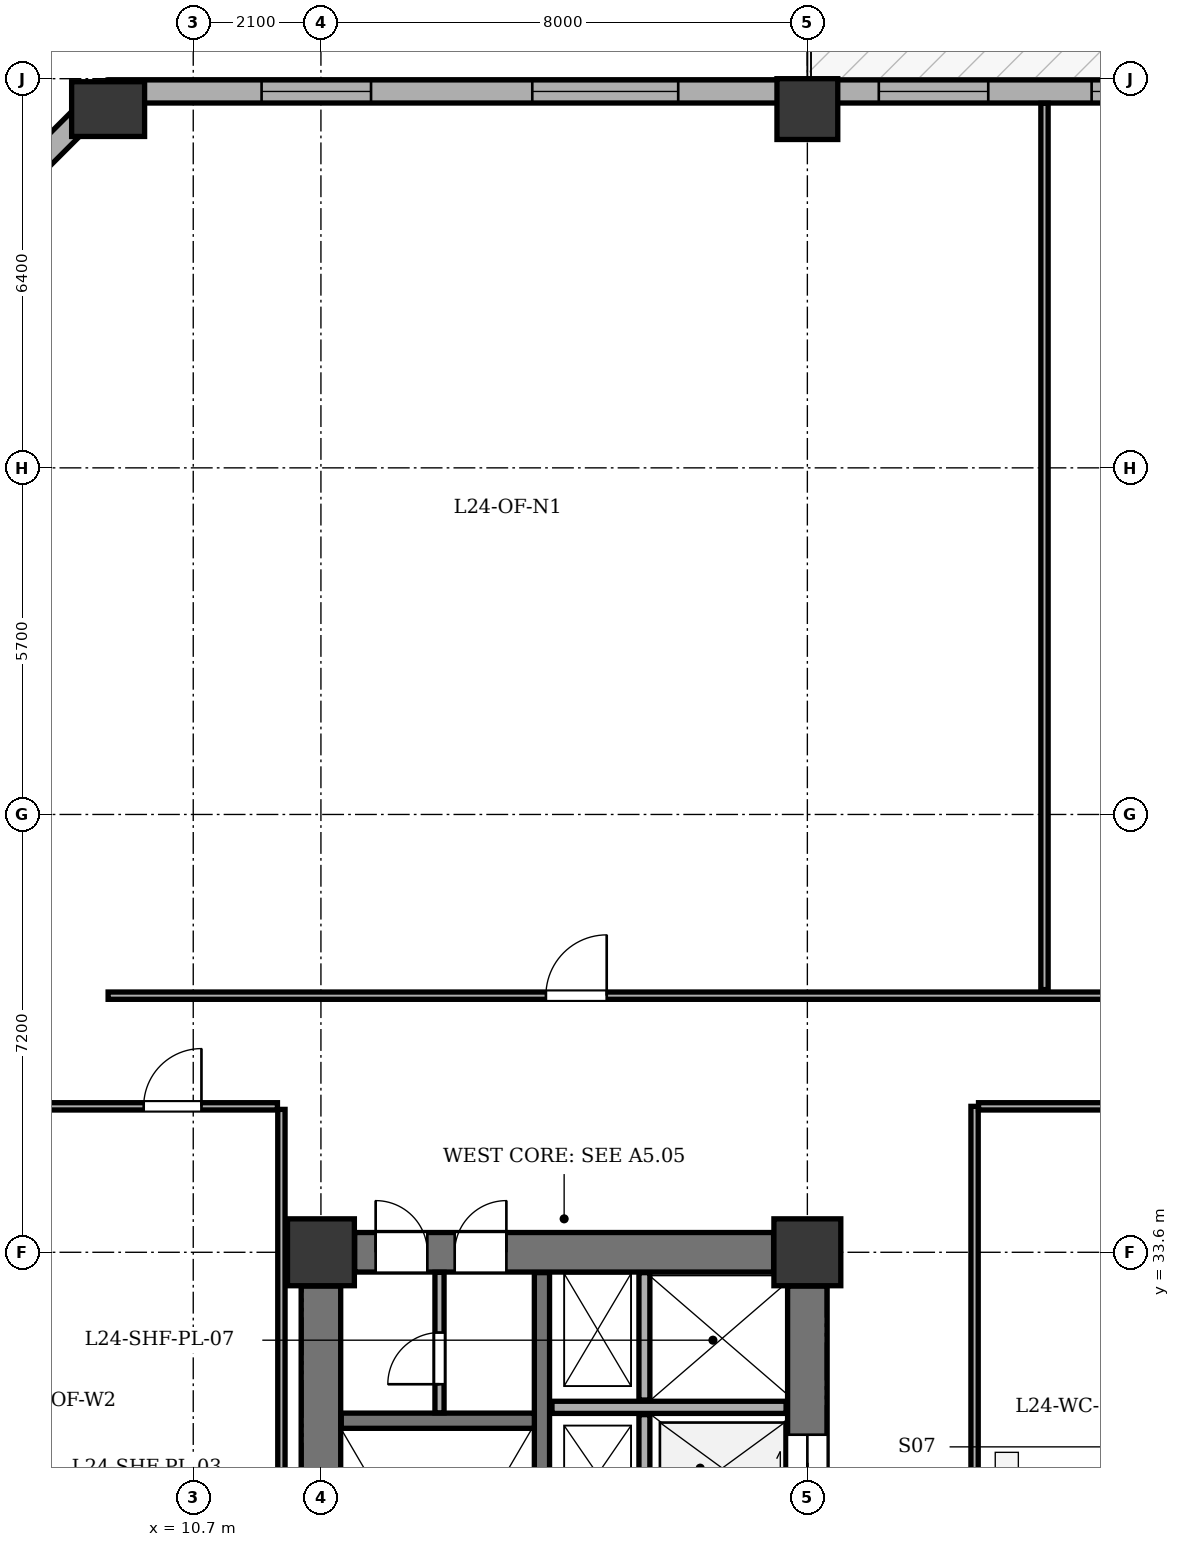
"""IFC4 building model, lengths in metres.
Left out: names, types, materials, properties, quantities, classifications, styles, units other than length and angle.
Written with IfcOpenShell. Run it as: python <this file> out.ifc"""

import sys

from ifc_helpers import new_model, si_unit, direction, frame, frame_2d, origin, origin_2d, place, context, subcontext, project, spatial, rectangle, extrude, element, fill, save


model = new_model("IFC4")
c1 = context("Model", 3, precision=1e-05, world=origin(), true_north=direction((0.0, 1.0)))
c2 = subcontext(c1, "Body", "Model", "MODEL_VIEW")
j1 = project(units=[si_unit("LENGTHUNIT", "METRE"), si_unit("PLANEANGLEUNIT", "RADIAN")], contexts=[c1])
p1 = place(None, origin())
s1 = spatial("IfcSite", under=j1, at=p1, CompositionType="ELEMENT")
p2 = place(p1, origin())
s2 = spatial("IfcBuilding", under=s1, at=p2, CompositionType="ELEMENT")
p3 = place(p2, frame((0.0, 0.0, 98.4)))
s3 = spatial("IfcBuildingStorey", under=s2, at=p3, CompositionType="ELEMENT", Elevation=98.4)
for number, where, z_axis, x_axis in (
    (1, (12.8, 33.6, 0.0), (0.0, 0.0, 1.0), (1.0, 0.0, 0.0)),
    (2, (20.8, 33.6, 0.0), (0.0, 0.0, 1.0), (1.0, 0.0, 0.0)),
):
    element("IfcColumn", number, at=place(p3, frame(where, z_axis=z_axis, x_axis=x_axis)), inside=s3, PredefinedType="COLUMN", context=c2, shape_type="SweptSolid", body=[
        extrude(rectangle(XDim=1.1, YDim=1.1, at=origin_2d()), origin(), (0.0, 0.0, 1.0), 3.9),
    ])
p4 = place(p3, frame((9.3, 52.4, 0.0), z_axis=(0.0, 0.0, 1.0), x_axis=(1.0, 0.0, 0.0)))
e3 = element("IfcColumn", 3, at=p4, inside=s3, PredefinedType="COLUMN", context=c2, shape_type="SweptSolid", body=[
    extrude(rectangle(XDim=0.9, YDim=1.2, at=origin_2d()), origin(), (0.0, 0.0, 1.0), 3.9),
])
p5 = place(p3, frame((20.8, 52.4, 0.0), z_axis=(0.0, 0.0, 1.0), x_axis=(1.0, 0.0, 0.0)))
e4 = element("IfcColumn", 4, at=p5, inside=s3, PredefinedType="COLUMN", context=c2, shape_type="SweptSolid", body=[
    extrude(rectangle(XDim=1.0, YDim=1.0, at=origin_2d()), origin(), (0.0, 0.0, 1.0), 3.9),
])
p6 = place(p3, frame((4.51, 47.9, 0.0), z_axis=(0.0, 0.0, 1.0), x_axis=(0.707106781187, 0.707106781187, 0.0)))
e5 = element("IfcWall", 5, at=p6, inside=s3, PredefinedType="STANDARD", context=c2, shape_type="SweptSolid", body=[
    extrude(rectangle(XDim=6.774, YDim=0.38, at=frame_2d((3.387, 0.0))), origin(), (0.0, 0.0, 1.0), 3.135),
])
p7 = place(p6, frame((2.687, 0.0, 0.8)))
e6 = element("IfcOpeningElement", 6, at=p7, cuts=e5, PredefinedType="OPENING", context=c2, shape_type="SweptSolid", body=[
    extrude(rectangle(XDim=1.4, YDim=1.65, at=frame_2d((0.7, 0.825))), frame((0.0, 0.2, 0.0), z_axis=(0.0, -1.0, 0.0), x_axis=(1.0, 0.0, 0.0)), (0.0, 0.0, 1.0), 0.4),
])
p8 = place(p3, frame((9.3, 52.69, 0.0), z_axis=(0.0, 0.0, 1.0), x_axis=(1.0, 0.0, 0.0)))
e7 = element("IfcWall", 7, at=p8, inside=s3, PredefinedType="STANDARD", context=c2, shape_type="SweptSolid", body=[
    extrude(rectangle(XDim=35.0, YDim=0.38, at=frame_2d((17.5, 0.0))), origin(), (0.0, 0.0, 1.0), 3.135),
])
p9 = place(p8, frame((22.0, 0.0, 0.0)))
e8 = element("IfcOpeningElement", 8, at=p9, cuts=e7, PredefinedType="OPENING", context=c2, shape_type="SweptSolid", body=[
    extrude(rectangle(XDim=1.0, YDim=2.02, at=frame_2d((0.5, 1.01))), frame((0.0, 0.2, 0.0), z_axis=(0.0, -1.0, 0.0), x_axis=(1.0, 0.0, 0.0)), (0.0, 0.0, 1.0), 0.4),
])
p10 = place(p8, frame((2.524, 0.0, 0.8)))
e9 = element("IfcOpeningElement", 9, at=p10, cuts=e7, PredefinedType="OPENING", context=c2, shape_type="SweptSolid", body=[
    extrude(rectangle(XDim=1.8, YDim=1.9, at=frame_2d((0.9, 0.95))), frame((0.0, 0.2, 0.0), z_axis=(0.0, -1.0, 0.0), x_axis=(1.0, 0.0, 0.0)), (0.0, 0.0, 1.0), 0.4),
])
p11 = place(p8, frame((6.976, 0.0, 0.8)))
e10 = element("IfcOpeningElement", 10, at=p11, cuts=e7, PredefinedType="OPENING", context=c2, shape_type="SweptSolid", body=[
    extrude(rectangle(XDim=2.4, YDim=1.9, at=frame_2d((1.2, 0.95))), frame((0.0, 0.2, 0.0), z_axis=(0.0, -1.0, 0.0), x_axis=(1.0, 0.0, 0.0)), (0.0, 0.0, 1.0), 0.4),
])
p12 = place(p8, frame((12.675, 0.0, 0.8)))
e11 = element("IfcOpeningElement", 11, at=p12, cuts=e7, PredefinedType="OPENING", context=c2, shape_type="SweptSolid", body=[
    extrude(rectangle(XDim=1.8, YDim=1.9, at=frame_2d((0.9, 0.95))), frame((0.0, 0.2, 0.0), z_axis=(0.0, -1.0, 0.0), x_axis=(1.0, 0.0, 0.0)), (0.0, 0.0, 1.0), 0.4),
])
p13 = place(p8, frame((16.175, 0.0, 0.8)))
e12 = element("IfcOpeningElement", 12, at=p13, cuts=e7, PredefinedType="OPENING", context=c2, shape_type="SweptSolid", body=[
    extrude(rectangle(XDim=1.5, YDim=1.9, at=frame_2d((0.75, 0.95))), frame((0.0, 0.2, 0.0), z_axis=(0.0, -1.0, 0.0), x_axis=(1.0, 0.0, 0.0)), (0.0, 0.0, 1.0), 0.4),
])
p14 = place(p8, frame((27.7, 0.0, 0.8)))
e13 = element("IfcOpeningElement", 13, at=p14, cuts=e7, PredefinedType="OPENING", context=c2, shape_type="SweptSolid", body=[
    extrude(rectangle(XDim=1.8, YDim=1.9, at=frame_2d((0.9, 0.95))), frame((0.0, 0.2, 0.0), z_axis=(0.0, -1.0, 0.0), x_axis=(1.0, 0.0, 0.0)), (0.0, 0.0, 1.0), 0.4),
])
p15 = place(p8, frame((31.0, 0.0, 0.8)))
e14 = element("IfcOpeningElement", 14, at=p15, cuts=e7, PredefinedType="OPENING", context=c2, shape_type="SweptSolid", body=[
    extrude(rectangle(XDim=2.4, YDim=1.9, at=frame_2d((1.2, 0.95))), frame((0.0, 0.2, 0.0), z_axis=(0.0, -1.0, 0.0), x_axis=(1.0, 0.0, 0.0)), (0.0, 0.0, 1.0), 0.4),
])
p16 = place(p3, frame((12.8, 21.355, 0.0), z_axis=(0.0, 0.0, 1.0), x_axis=(0.0, 1.0, 0.0)))
e15 = element("IfcWall", 15, at=p16, inside=s3, PredefinedType="SHEAR", context=c2, shape_type="SweptSolid", body=[
    extrude(rectangle(XDim=11.69, YDim=0.65, at=frame_2d((5.845, 0.0))), origin(), (0.0, 0.0, 1.0), 3.6),
])
p17 = place(p3, frame((13.355, 33.6, 0.0), z_axis=(0.0, 0.0, 1.0), x_axis=(1.0, 0.0, 0.0)))
e16 = element("IfcWall", 16, at=p17, inside=s3, PredefinedType="SHEAR", context=c2, shape_type="SweptSolid", body=[
    extrude(rectangle(XDim=6.89, YDim=0.65, at=frame_2d((3.445, 0.0))), origin(), (0.0, 0.0, 1.0), 3.6),
])
p18 = place(p17, frame((0.345, 0.0, 0.0)))
e17 = element("IfcOpeningElement", 17, at=p18, cuts=e16, PredefinedType="OPENING", context=c2, shape_type="SweptSolid", body=[
    extrude(rectangle(XDim=0.85, YDim=2.02, at=frame_2d((0.425, 1.01))), frame((0.0, 0.335, 0.0), z_axis=(0.0, -1.0, 0.0), x_axis=(1.0, 0.0, 0.0)), (0.0, 0.0, 1.0), 0.67),
])
p19 = place(p17, frame((1.645, 0.0, 0.0)))
e18 = element("IfcOpeningElement", 18, at=p19, cuts=e16, PredefinedType="OPENING", context=c2, shape_type="SweptSolid", body=[
    extrude(rectangle(XDim=0.85, YDim=2.02, at=frame_2d((0.425, 1.01))), frame((0.0, 0.335, 0.0), z_axis=(0.0, -1.0, 0.0), x_axis=(1.0, 0.0, 0.0)), (0.0, 0.0, 1.0), 0.67),
])
p20 = place(p3, frame((20.8, 21.355, 0.0), z_axis=(0.0, 0.0, 1.0), x_axis=(0.0, 1.0, 0.0)))
e19 = element("IfcWall", 19, at=p20, inside=s3, PredefinedType="SHEAR", context=c2, shape_type="SweptSolid", body=[
    extrude(rectangle(XDim=11.69, YDim=0.65, at=frame_2d((5.845, 0.0))), origin(), (0.0, 0.0, 1.0), 3.6),
])
p21 = place(p20, frame((1.245, 0.0, 0.0)))
e20 = element("IfcOpeningElement", 20, at=p21, cuts=e19, PredefinedType="OPENING", context=c2, shape_type="SweptSolid", body=[
    extrude(rectangle(XDim=1.2, YDim=2.15, at=frame_2d((0.6, 1.075))), frame((0.0, 0.335, 0.0), z_axis=(0.0, -1.0, 0.0), x_axis=(1.0, 0.0, 0.0)), (0.0, 0.0, 1.0), 0.67),
])
p22 = place(p20, frame((4.245, 0.0, 0.0)))
e21 = element("IfcOpeningElement", 21, at=p22, cuts=e19, PredefinedType="OPENING", context=c2, shape_type="SweptSolid", body=[
    extrude(rectangle(XDim=1.1, YDim=2.1, at=frame_2d((0.55, 1.05))), frame((0.0, 0.335, 0.0), z_axis=(0.0, -1.0, 0.0), x_axis=(1.0, 0.0, 0.0)), (0.0, 0.0, 1.0), 0.67),
])
p23 = place(p20, frame((6.195, 0.0, 0.0)))
e22 = element("IfcOpeningElement", 22, at=p23, cuts=e19, PredefinedType="OPENING", context=c2, shape_type="SweptSolid", body=[
    extrude(rectangle(XDim=1.1, YDim=2.1, at=frame_2d((0.55, 1.05))), frame((0.0, 0.335, 0.0), z_axis=(0.0, -1.0, 0.0), x_axis=(1.0, 0.0, 0.0)), (0.0, 0.0, 1.0), 0.67),
])
p24 = place(p20, frame((8.145, 0.0, 0.0)))
e23 = element("IfcOpeningElement", 23, at=p24, cuts=e19, PredefinedType="OPENING", context=c2, shape_type="SweptSolid", body=[
    extrude(rectangle(XDim=1.1, YDim=2.1, at=frame_2d((0.55, 1.05))), frame((0.0, 0.335, 0.0), z_axis=(0.0, -1.0, 0.0), x_axis=(1.0, 0.0, 0.0)), (0.0, 0.0, 1.0), 0.67),
])
p25 = place(p3, frame((16.435, 21.135, 0.0), z_axis=(0.0, 0.0, 1.0), x_axis=(0.0, 1.0, 0.0)))
e24 = element("IfcWall", 24, at=p25, inside=s3, PredefinedType="SHEAR", context=c2, shape_type="SweptSolid", body=[
    extrude(rectangle(XDim=12.13, YDim=0.25, at=frame_2d((6.065, 0.0))), origin(), (0.0, 0.0, 1.0), 3.6),
])
p26 = place(p25, frame((0.515, 0.0, 0.0)))
e25 = element("IfcOpeningElement", 25, at=p26, cuts=e24, PredefinedType="OPENING", context=c2, shape_type="SweptSolid", body=[
    extrude(rectangle(XDim=1.2, YDim=2.15, at=frame_2d((0.6, 1.075))), frame((0.0, 0.135, 0.0), z_axis=(0.0, -1.0, 0.0), x_axis=(1.0, 0.0, 0.0)), (0.0, 0.0, 1.0), 0.27),
])
p27 = place(p25, frame((2.665, 0.0, 0.0)))
e26 = element("IfcOpeningElement", 26, at=p27, cuts=e24, PredefinedType="OPENING", context=c2, shape_type="SweptSolid", body=[
    extrude(rectangle(XDim=1.15, YDim=2.15, at=frame_2d((0.575, 1.075))), frame((0.0, 0.135, 0.0), z_axis=(0.0, -1.0, 0.0), x_axis=(1.0, 0.0, 0.0)), (0.0, 0.0, 1.0), 0.27),
])
p28 = place(p3, frame((13.135, 30.83, 0.0), z_axis=(0.0, 0.0, 1.0), x_axis=(1.0, 0.0, 0.0)))
e27 = element("IfcWall", 27, at=p28, inside=s3, PredefinedType="SHEAR", context=c2, shape_type="SweptSolid", body=[
    extrude(rectangle(XDim=3.175, YDim=0.25, at=frame_2d((1.587, 0.0))), origin(), (0.0, 0.0, 1.0), 3.6),
])
p29 = place(p3, frame((16.6, 31.05, 0.0), z_axis=(0.0, 0.0, 1.0), x_axis=(1.0, 0.0, 0.0)))
e28 = element("IfcWall", 28, at=p29, inside=s3, PredefinedType="SOLIDWALL", context=c2, shape_type="SweptSolid", body=[
    extrude(rectangle(XDim=3.85, YDim=0.2, at=frame_2d((1.925, 0.0))), origin(), (0.0, 0.0, 1.0), 3.6),
])
p30 = place(p3, frame((18.12, 25.27, 0.0), z_axis=(0.0, 0.0, 1.0), x_axis=(0.0, 1.0, 0.0)))
e29 = element("IfcWall", 29, at=p30, inside=s3, PredefinedType="PARTITIONING", context=c2, shape_type="SweptSolid", body=[
    extrude(rectangle(XDim=5.66, YDim=0.18, at=frame_2d((2.83, 0.0))), origin(), (0.0, 0.0, 1.0), 3.6),
])
p31 = place(p3, frame((18.12, 31.17, 0.0), z_axis=(0.0, 0.0, 1.0), x_axis=(0.0, 1.0, 0.0)))
e30 = element("IfcWall", 30, at=p31, inside=s3, PredefinedType="PARTITIONING", context=c2, shape_type="SweptSolid", body=[
    extrude(rectangle(XDim=2.095, YDim=0.18, at=frame_2d((1.047, 0.0))), origin(), (0.0, 0.0, 1.0), 3.6),
])
p32 = place(p3, frame((14.75, 30.96, 0.0), z_axis=(0.0, 0.0, 1.0), x_axis=(0.0, 1.0, 0.0)))
e31 = element("IfcWall", 31, at=p32, inside=s3, PredefinedType="PARTITIONING", context=c2, shape_type="SweptSolid", body=[
    extrude(rectangle(XDim=2.31, YDim=0.15, at=frame_2d((1.155, 0.0))), origin(), (0.0, 0.0, 1.0), 3.6),
])
p33 = place(p32, frame((0.47, 0.0, 0.0)))
e32 = element("IfcOpeningElement", 32, at=p33, cuts=e31, PredefinedType="OPENING", context=c2, shape_type="SweptSolid", body=[
    extrude(rectangle(XDim=0.85, YDim=2.02, at=frame_2d((0.425, 1.01))), frame((0.0, 0.085, 0.0), z_axis=(0.0, -1.0, 0.0), x_axis=(1.0, 0.0, 0.0)), (0.0, 0.0, 1.0), 0.17),
])
p34 = place(p3, frame((23.55, 24.715, 0.0), z_axis=(0.0, 0.0, 1.0), x_axis=(0.0, 1.0, 0.0)))
e33 = element("IfcWall", 33, at=p34, inside=s3, PredefinedType="PARTITIONING", context=c2, shape_type="SweptSolid", body=[
    extrude(rectangle(XDim=11.285, YDim=0.12, at=frame_2d((5.643, 0.0))), origin(), (0.0, 0.0, 1.0), 3.6),
])
p35 = place(p3, frame((23.615, 36.0, 0.0), z_axis=(0.0, 0.0, 1.0), x_axis=(1.0, 0.0, 0.0)))
e34 = element("IfcWall", 34, at=p35, inside=s3, PredefinedType="PARTITIONING", context=c2, shape_type="SweptSolid", body=[
    extrude(rectangle(XDim=8.77, YDim=0.12, at=frame_2d((4.385, 0.0))), origin(), (0.0, 0.0, 1.0), 3.6),
])
p36 = place(p3, frame((9.3, 37.82, 0.0), z_axis=(0.0, 0.0, 1.0), x_axis=(1.0, 0.0, 0.0)))
e35 = element("IfcWall", 35, at=p36, inside=s3, PredefinedType="PARTITIONING", context=c2, shape_type="SweptSolid", body=[
    extrude(rectangle(XDim=35.0, YDim=0.12, at=frame_2d((17.5, 0.0))), origin(), (0.0, 0.0, 1.0), 3.6),
])
p37 = place(p36, frame((7.2, 0.0, 0.0)))
e36 = element("IfcOpeningElement", 36, at=p37, cuts=e35, PredefinedType="OPENING", context=c2, shape_type="SweptSolid", body=[
    extrude(rectangle(XDim=1.0, YDim=2.1, at=frame_2d((0.5, 1.05))), frame((0.0, 0.07, 0.0), z_axis=(0.0, -1.0, 0.0), x_axis=(1.0, 0.0, 0.0)), (0.0, 0.0, 1.0), 0.14),
])
p38 = place(p36, frame((24.7, 0.0, 0.0)))
e37 = element("IfcOpeningElement", 37, at=p38, cuts=e35, PredefinedType="OPENING", context=c2, shape_type="SweptSolid", body=[
    extrude(rectangle(XDim=1.0, YDim=2.1, at=frame_2d((0.5, 1.05))), frame((0.0, 0.07, 0.0), z_axis=(0.0, -1.0, 0.0), x_axis=(1.0, 0.0, 0.0)), (0.0, 0.0, 1.0), 0.14),
])
p39 = place(p3, frame((24.7, 37.92, 0.0), z_axis=(0.0, 0.0, 1.0), x_axis=(0.0, 1.0, 0.0)))
e38 = element("IfcWall", 38, at=p39, inside=s3, PredefinedType="PARTITIONING", context=c2, shape_type="SweptSolid", body=[
    extrude(rectangle(XDim=14.575, YDim=0.12, at=frame_2d((7.288, 0.0))), origin(), (0.0, 0.0, 1.0), 3.6),
])
p40 = place(p3, frame((12.15, 18.45, 0.0), z_axis=(0.0, 0.0, 1.0), x_axis=(0.0, 1.0, 0.0)))
e39 = element("IfcWall", 39, at=p40, inside=s3, PredefinedType="PARTITIONING", context=c2, shape_type="SweptSolid", body=[
    extrude(rectangle(XDim=17.5, YDim=0.12, at=frame_2d((8.75, 0.0))), origin(), (0.0, 0.0, 1.0), 3.6),
])
p41 = place(p3, frame((4.705, 36.0, 0.0), z_axis=(0.0, 0.0, 1.0), x_axis=(1.0, 0.0, 0.0)))
e40 = element("IfcWall", 40, at=p41, inside=s3, PredefinedType="PARTITIONING", context=c2, shape_type="SweptSolid", body=[
    extrude(rectangle(XDim=7.38, YDim=0.12, at=frame_2d((3.69, 0.0))), origin(), (0.0, 0.0, 1.0), 3.6),
])
p42 = place(p41, frame((5.18, 0.0, 0.0)))
e41 = element("IfcOpeningElement", 41, at=p42, cuts=e40, PredefinedType="OPENING", context=c2, shape_type="SweptSolid", body=[
    extrude(rectangle(XDim=0.95, YDim=2.1, at=frame_2d((0.475, 1.05))), frame((0.0, 0.07, 0.0), z_axis=(0.0, -1.0, 0.0), x_axis=(1.0, 0.0, 0.0)), (0.0, 0.0, 1.0), 0.14),
])
p43 = place(p10, origin())
e42 = element("IfcWindow", 42, at=p43, inside=s3, PartitioningType="SINGLE_PANEL", PredefinedType="WINDOW", context=c2, shape_type="SweptSolid", body=[
    extrude(rectangle(XDim=1.8, YDim=1.9, at=frame_2d((0.9, 0.95))), frame((0.0, -0.01, 0.0), z_axis=(0.0, -1.0, 0.0), x_axis=(1.0, 0.0, 0.0)), (0.0, 0.0, 1.0), 0.06),
])
fill(e9, e42)
p44 = place(p11, origin())
e43 = element("IfcWindow", 43, at=p44, inside=s3, PartitioningType="SINGLE_PANEL", PredefinedType="WINDOW", context=c2, shape_type="SweptSolid", body=[
    extrude(rectangle(XDim=2.4, YDim=1.9, at=frame_2d((1.2, 0.95))), frame((0.0, -0.01, 0.0), z_axis=(0.0, -1.0, 0.0), x_axis=(1.0, 0.0, 0.0)), (0.0, 0.0, 1.0), 0.06),
])
fill(e10, e43)
p45 = place(p12, origin())
e44 = element("IfcWindow", 44, at=p45, inside=s3, PartitioningType="SINGLE_PANEL", PredefinedType="WINDOW", context=c2, shape_type="SweptSolid", body=[
    extrude(rectangle(XDim=1.8, YDim=1.9, at=frame_2d((0.9, 0.95))), frame((0.0, -0.01, 0.0), z_axis=(0.0, -1.0, 0.0), x_axis=(1.0, 0.0, 0.0)), (0.0, 0.0, 1.0), 0.06),
])
fill(e11, e44)
p46 = place(p13, origin())
e45 = element("IfcWindow", 45, at=p46, inside=s3, PartitioningType="SINGLE_PANEL", PredefinedType="WINDOW", context=c2, shape_type="SweptSolid", body=[
    extrude(rectangle(XDim=1.5, YDim=1.9, at=frame_2d((0.75, 0.95))), frame((0.0, -0.01, 0.0), z_axis=(0.0, -1.0, 0.0), x_axis=(1.0, 0.0, 0.0)), (0.0, 0.0, 1.0), 0.06),
])
fill(e12, e45)
p47 = place(p18, origin())
e46 = element("IfcDoor", 46, at=p47, inside=s3, OperationType="SINGLE_SWING_LEFT", PredefinedType="DOOR", context=c2, shape_type="SweptSolid", body=[
    extrude(rectangle(XDim=0.85, YDim=2.02, at=frame_2d((0.425, 1.01))), frame((0.0, 0.025, 0.0), z_axis=(0.0, -1.0, 0.0), x_axis=(1.0, 0.0, 0.0)), (0.0, 0.0, 1.0), 0.05),
])
fill(e17, e46)
p48 = place(p19, origin())
e47 = element("IfcDoor", 47, at=p48, inside=s3, OperationType="SINGLE_SWING_RIGHT", PredefinedType="DOOR", context=c2, shape_type="SweptSolid", body=[
    extrude(rectangle(XDim=0.85, YDim=2.02, at=frame_2d((0.425, 1.01))), frame((0.0, 0.025, 0.0), z_axis=(0.0, -1.0, 0.0), x_axis=(1.0, 0.0, 0.0)), (0.0, 0.0, 1.0), 0.05),
])
fill(e18, e47)
p49 = place(p24, origin())
e48 = element("IfcDoor", 48, at=p49, inside=s3, OperationType="DOUBLE_DOOR_SLIDING", PredefinedType="DOOR", context=c2, shape_type="SweptSolid", body=[
    extrude(rectangle(XDim=1.1, YDim=2.1, at=frame_2d((0.55, 1.05))), frame((0.0, 0.025, 0.0), z_axis=(0.0, -1.0, 0.0), x_axis=(1.0, 0.0, 0.0)), (0.0, 0.0, 1.0), 0.05),
])
fill(e23, e48)
p50 = place(p33, origin())
e49 = element("IfcDoor", 49, at=p50, inside=s3, OperationType="SINGLE_SWING_LEFT", PredefinedType="DOOR", context=c2, shape_type="SweptSolid", body=[
    extrude(rectangle(XDim=0.85, YDim=2.02, at=frame_2d((0.425, 1.01))), frame((0.0, 0.025, 0.0), z_axis=(0.0, -1.0, 0.0), x_axis=(1.0, 0.0, 0.0)), (0.0, 0.0, 1.0), 0.05),
])
fill(e32, e49)
p51 = place(p37, origin())
e50 = element("IfcDoor", 50, at=p51, inside=s3, OperationType="SINGLE_SWING_RIGHT", PredefinedType="DOOR", context=c2, shape_type="SweptSolid", body=[
    extrude(rectangle(XDim=1.0, YDim=2.1, at=frame_2d((0.5, 1.05))), frame((0.0, 0.025, 0.0), z_axis=(0.0, -1.0, 0.0), x_axis=(1.0, 0.0, 0.0)), (0.0, 0.0, 1.0), 0.05),
])
fill(e36, e50)
p52 = place(p42, origin())
e51 = element("IfcDoor", 51, at=p52, inside=s3, OperationType="SINGLE_SWING_RIGHT", PredefinedType="DOOR", context=c2, shape_type="SweptSolid", body=[
    extrude(rectangle(XDim=0.95, YDim=2.1, at=frame_2d((0.475, 1.05))), frame((0.0, 0.025, 0.0), z_axis=(0.0, -1.0, 0.0), x_axis=(1.0, 0.0, 0.0)), (0.0, 0.0, 1.0), 0.05),
])
fill(e41, e51)
save(model, sys.argv[1])
